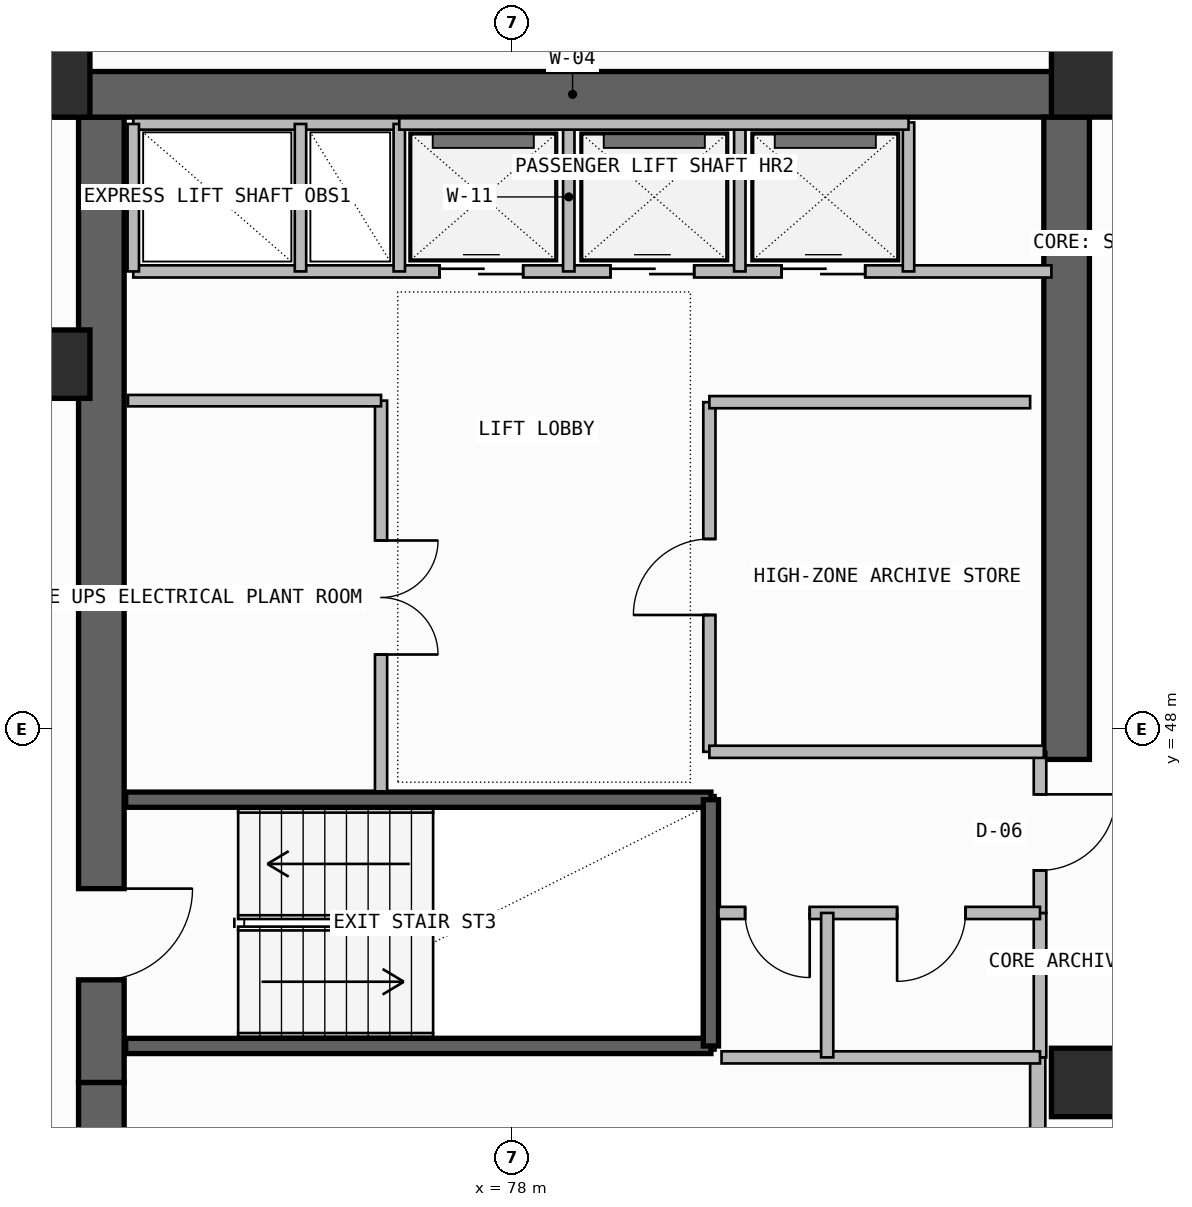
"""IFC4 building model, lengths in metres.
Left out: names, types, materials, properties, quantities, classifications, styles, units other than length and angle.
Written with IfcOpenShell. Run it as: python <this file> out.ifc"""

import sys

from ifc_helpers import new_model, si_unit, direction, frame, frame_2d, origin, origin_2d, place, context, subcontext, project, spatial, rectangle, extrude, element, fill, save


model = new_model("IFC4")
c1 = context("Model", 3, precision=1e-05, world=origin(), true_north=direction((0.0, 1.0)))
c2 = subcontext(c1, "Body", "Model", "MODEL_VIEW")
j1 = project(units=[si_unit("LENGTHUNIT", "METRE"), si_unit("PLANEANGLEUNIT", "RADIAN")], contexts=[c1])
p1 = place(None, origin())
s1 = spatial("IfcSite", under=j1, at=p1, CompositionType="ELEMENT")
p2 = place(p1, origin())
s2 = spatial("IfcBuilding", under=s1, at=p2, CompositionType="ELEMENT")
p3 = place(p2, frame((0.0, 0.0, 257.22)))
s3 = spatial("IfcBuildingStorey", under=s2, at=p3, CompositionType="ELEMENT", Elevation=257.22)
p4 = place(p3, frame((72.6, 35.5, -0.26), z_axis=(0.0, 0.0, 1.0), x_axis=(0.0, 1.0, 0.0)))
e1 = element("IfcWall", 1, at=p4, inside=s3, PredefinedType="SHEAR", context=c2, shape_type="SweptSolid", body=[
    extrude(rectangle(XDim=7.85, YDim=0.6, at=frame_2d((3.925, 0.0))), origin(), (0.0, 0.0, 1.0), 3.52),
])
p5 = place(p4, frame((1.45, 0.0, 0.26)))
e2 = element("IfcOpeningElement", 2, at=p5, cuts=e1, PredefinedType="OPENING", context=c2, shape_type="SweptSolid", body=[
    extrude(rectangle(XDim=1.2, YDim=2.2, at=frame_2d((0.6, 1.1))), frame((0.0, 0.31, 0.0), z_axis=(0.0, -1.0, 0.0), x_axis=(1.0, 0.0, 0.0)), (0.0, 0.0, 1.0), 0.62),
])
p6 = place(p3, frame((72.6, 43.35, -0.26), z_axis=(0.0, 0.0, 1.0), x_axis=(0.0, 1.0, 0.0)))
e3 = element("IfcWall", 3, at=p6, inside=s3, PredefinedType="SHEAR", context=c2, shape_type="SweptSolid", body=[
    extrude(rectangle(XDim=12.7, YDim=0.6, at=frame_2d((6.35, 0.0))), origin(), (0.0, 0.0, 1.0), 3.52),
])
p7 = place(p6, frame((1.35, 0.0, 0.26)))
e4 = element("IfcOpeningElement", 4, at=p7, cuts=e3, PredefinedType="OPENING", context=c2, shape_type="SweptSolid", body=[
    extrude(rectangle(XDim=1.2, YDim=2.2, at=frame_2d((0.6, 1.1))), frame((0.0, 0.31, 0.0), z_axis=(0.0, -1.0, 0.0), x_axis=(1.0, 0.0, 0.0)), (0.0, 0.0, 1.0), 0.62),
])
p8 = place(p3, frame((72.0, 56.35, -0.26), z_axis=(0.0, 0.0, 1.0), x_axis=(1.0, 0.0, 0.0)))
e5 = element("IfcWall", 5, at=p8, inside=s3, PredefinedType="SHEAR", context=c2, shape_type="SweptSolid", body=[
    extrude(rectangle(XDim=13.6, YDim=0.6, at=frame_2d((6.8, 0.0))), origin(), (0.0, 0.0, 1.0), 3.52),
])
p9 = place(p3, frame((85.3, 47.6, -0.26), z_axis=(0.0, 0.0, 1.0), x_axis=(0.0, 1.0, 0.0)))
e6 = element("IfcWall", 6, at=p9, inside=s3, PredefinedType="SHEAR", context=c2, shape_type="SweptSolid", body=[
    extrude(rectangle(XDim=8.45, YDim=0.6, at=frame_2d((4.225, 0.0))), origin(), (0.0, 0.0, 1.0), 3.52),
])
for number, where, z_axis, x_axis in (
    (7, (85.55, 43.35, 0.0), (0.0, 0.0, 1.0), (1.0, 0.0, 0.0)),
    (8, (72.0, 52.8, 0.0), (0.0, 0.0, 1.0), (1.0, 0.0, 0.0)),
    (9, (72.0, 56.5, 0.0), (0.0, 0.0, 1.0), (1.0, 0.0, 0.0)),
    (10, (85.55, 56.5, 0.0), (0.0, 0.0, 1.0), (1.0, 0.0, 0.0)),
):
    element("IfcColumn", number, at=place(p3, frame(where, z_axis=z_axis, x_axis=x_axis)), inside=s3, PredefinedType="COLUMN", context=c2, shape_type="SweptSolid", body=[
        extrude(rectangle(XDim=0.9, YDim=0.9, at=origin_2d()), origin(), (0.0, 0.0, 1.0), 3.52),
    ])
p10 = place(p3, frame((84.92, 38.85, 0.0), z_axis=(0.0, 0.0, 1.0), x_axis=(0.0, 1.0, 0.0)))
e11 = element("IfcWall", 11, at=p10, inside=s3, PredefinedType="SOLIDWALL", context=c2, shape_type="SweptSolid", body=[
    extrude(rectangle(XDim=4.83, YDim=0.2, at=frame_2d((2.415, 0.0))), origin(), (0.0, 0.0, 1.0), 3.26),
])
p11 = place(p10, frame((1.25, 0.0, 0.0)))
e12 = element("IfcOpeningElement", 12, at=p11, cuts=e11, PredefinedType="OPENING", context=c2, shape_type="SweptSolid", body=[
    extrude(rectangle(XDim=1.1, YDim=2.2, at=frame_2d((0.55, 1.1))), frame((0.0, 0.11, 0.0), z_axis=(0.0, -1.0, 0.0), x_axis=(1.0, 0.0, 0.0)), (0.0, 0.0, 1.0), 0.22),
])
for number, where, z_axis, x_axis in (
    (13, (72.92, 43.83, -0.26), (0.0, 0.0, 1.0), (1.0, 0.0, 0.0)),
    (14, (72.92, 47.07, -0.26), (0.0, 0.0, 1.0), (1.0, 0.0, 0.0)),
):
    element("IfcWall", number, at=place(p3, frame(where, z_axis=z_axis, x_axis=x_axis)), inside=s3, PredefinedType="SOLIDWALL", context=c2, shape_type="SweptSolid", body=[
        extrude(rectangle(XDim=7.7, YDim=0.2, at=frame_2d((3.85, 0.0))), origin(), (0.0, 0.0, 1.0), 3.52),
    ])
p12 = place(p3, frame((80.62, 43.83, -0.26), z_axis=(0.0, 0.0, 1.0), x_axis=(0.0, 1.0, 0.0)))
e15 = element("IfcWall", 15, at=p12, inside=s3, PredefinedType="SOLIDWALL", context=c2, shape_type="SweptSolid", body=[
    extrude(rectangle(XDim=3.24, YDim=0.2, at=frame_2d((1.62, 0.0))), origin(), (0.0, 0.0, 1.0), 3.52),
])
p13 = place(p3, frame((84.95, 43.68, 0.0), z_axis=(0.0, 0.0, 1.0), x_axis=(0.0, 1.0, 0.0)))
e16 = element("IfcWall", 16, at=p13, inside=s3, PredefinedType="PLUMBINGWALL", context=c2, shape_type="SweptSolid", body=[
    extrude(rectangle(XDim=1.9, YDim=0.165, at=frame_2d((0.95, 0.0))), origin(), (0.0, 0.0, 1.0), 3.26),
])
p14 = place(p3, frame((84.95, 45.58, 0.0), z_axis=(0.0, 0.0, 1.0), x_axis=(0.0, 1.0, 0.0)))
e17 = element("IfcWall", 17, at=p14, inside=s3, PredefinedType="PARTITIONING", context=c2, shape_type="SweptSolid", body=[
    extrude(rectangle(XDim=2.12, YDim=0.165, at=frame_2d((1.06, 0.0))), origin(), (0.0, 0.0, 1.0), 3.26),
])
p15 = place(p14, frame((0.56, 0.0, 0.0)))
e18 = element("IfcOpeningElement", 18, at=p15, cuts=e17, PredefinedType="OPENING", context=c2, shape_type="SweptSolid", body=[
    extrude(rectangle(XDim=1.0, YDim=2.2, at=frame_2d((0.5, 1.1))), frame((0.0, 0.093, 0.0), z_axis=(0.0, -1.0, 0.0), x_axis=(1.0, 0.0, 0.0)), (0.0, 0.0, 1.0), 0.185),
])
p16 = place(p3, frame((80.72, 45.58, 0.0), z_axis=(0.0, 0.0, 1.0), x_axis=(1.0, 0.0, 0.0)))
e19 = element("IfcWall", 19, at=p16, inside=s3, PredefinedType="PLUMBINGWALL", context=c2, shape_type="SweptSolid", body=[
    extrude(rectangle(XDim=4.23, YDim=0.16, at=frame_2d((2.115, 0.0))), origin(), (0.0, 0.0, 1.0), 3.26),
])
p17 = place(p16, frame((0.35, 0.0, 0.0)))
e20 = element("IfcOpeningElement", 20, at=p17, cuts=e19, PredefinedType="OPENING", context=c2, shape_type="SweptSolid", body=[
    extrude(rectangle(XDim=0.85, YDim=2.05, at=frame_2d((0.425, 1.025))), frame((0.0, 0.09, 0.0), z_axis=(0.0, -1.0, 0.0), x_axis=(1.0, 0.0, 0.0)), (0.0, 0.0, 1.0), 0.18),
])
p18 = place(p16, frame((2.35, 0.0, 0.0)))
e21 = element("IfcOpeningElement", 21, at=p18, cuts=e19, PredefinedType="OPENING", context=c2, shape_type="SweptSolid", body=[
    extrude(rectangle(XDim=0.9, YDim=2.1, at=frame_2d((0.45, 1.05))), frame((0.0, 0.09, 0.0), z_axis=(0.0, -1.0, 0.0), x_axis=(1.0, 0.0, 0.0)), (0.0, 0.0, 1.0), 0.18),
])
p19 = place(p3, frame((80.76, 43.68, 0.0), z_axis=(0.0, 0.0, 1.0), x_axis=(1.0, 0.0, 0.0)))
e22 = element("IfcWall", 22, at=p19, inside=s3, PredefinedType="PLUMBINGWALL", context=c2, shape_type="SweptSolid", body=[
    extrude(rectangle(XDim=4.19, YDim=0.16, at=frame_2d((2.095, 0.0))), origin(), (0.0, 0.0, 1.0), 3.26),
])
p20 = place(p3, frame((82.15, 43.68, 0.0), z_axis=(0.0, 0.0, 1.0), x_axis=(0.0, 1.0, 0.0)))
e23 = element("IfcWall", 23, at=p20, inside=s3, PredefinedType="PLUMBINGWALL", context=c2, shape_type="SweptSolid", body=[
    extrude(rectangle(XDim=1.9, YDim=0.16, at=frame_2d((0.95, 0.0))), origin(), (0.0, 0.0, 1.0), 3.26),
])
p21 = place(p3, frame((76.28, 47.18, 0.0), z_axis=(0.0, 0.0, 1.0), x_axis=(0.0, 1.0, 0.0)))
e24 = element("IfcWall", 24, at=p21, inside=s3, PredefinedType="SOLIDWALL", context=c2, shape_type="SweptSolid", body=[
    extrude(rectangle(XDim=5.14, YDim=0.16, at=frame_2d((2.57, 0.0))), origin(), (0.0, 0.0, 1.0), 3.26),
])
p22 = place(p21, frame((1.8, 0.0, 0.0)))
e25 = element("IfcOpeningElement", 25, at=p22, cuts=e24, PredefinedType="OPENING", context=c2, shape_type="SweptSolid", body=[
    extrude(rectangle(XDim=1.5, YDim=2.25, at=frame_2d((0.75, 1.125))), frame((0.0, 0.09, 0.0), z_axis=(0.0, -1.0, 0.0), x_axis=(1.0, 0.0, 0.0)), (0.0, 0.0, 1.0), 0.18),
])
p23 = place(p3, frame((72.95, 52.32, 0.0), z_axis=(0.0, 0.0, 1.0), x_axis=(1.0, 0.0, 0.0)))
e26 = element("IfcWall", 26, at=p23, inside=s3, PredefinedType="SOLIDWALL", context=c2, shape_type="SweptSolid", body=[
    extrude(rectangle(XDim=3.33, YDim=0.15, at=frame_2d((1.665, 0.0))), origin(), (0.0, 0.0, 1.0), 3.26),
])
p24 = place(p3, frame((80.6, 47.7, 0.0), z_axis=(0.0, 0.0, 1.0), x_axis=(0.0, 1.0, 0.0)))
e27 = element("IfcWall", 27, at=p24, inside=s3, PredefinedType="SOLIDWALL", context=c2, shape_type="SweptSolid", body=[
    extrude(rectangle(XDim=4.6, YDim=0.16, at=frame_2d((2.3, 0.0))), origin(), (0.0, 0.0, 1.0), 3.26),
])
p25 = place(p24, frame((1.8, 0.0, 0.0)))
e28 = element("IfcOpeningElement", 28, at=p25, cuts=e27, PredefinedType="OPENING", context=c2, shape_type="SweptSolid", body=[
    extrude(rectangle(XDim=1.0, YDim=2.2, at=frame_2d((0.5, 1.1))), frame((0.0, 0.09, 0.0), z_axis=(0.0, -1.0, 0.0), x_axis=(1.0, 0.0, 0.0)), (0.0, 0.0, 1.0), 0.18),
])
p26 = place(p3, frame((80.6, 47.7, 0.0), z_axis=(0.0, 0.0, 1.0), x_axis=(1.0, 0.0, 0.0)))
e29 = element("IfcWall", 29, at=p26, inside=s3, PredefinedType="SOLIDWALL", context=c2, shape_type="SweptSolid", body=[
    extrude(rectangle(XDim=4.4, YDim=0.16, at=frame_2d((2.2, 0.0))), origin(), (0.0, 0.0, 1.0), 3.26),
])
p27 = place(p3, frame((80.6, 52.3, 0.0), z_axis=(0.0, 0.0, 1.0), x_axis=(1.0, 0.0, 0.0)))
e30 = element("IfcWall", 30, at=p27, inside=s3, PredefinedType="SOLIDWALL", context=c2, shape_type="SweptSolid", body=[
    extrude(rectangle(XDim=4.22, YDim=0.16, at=frame_2d((2.11, 0.0))), origin(), (0.0, 0.0, 1.0), 3.26),
])
p28 = place(p3, frame((73.02, 54.02, 0.0), z_axis=(0.0, 0.0, 1.0), x_axis=(1.0, 0.0, 0.0)))
e31 = element("IfcWall", 31, at=p28, inside=s3, PredefinedType="SOLIDWALL", context=c2, shape_type="SweptSolid", body=[
    extrude(rectangle(XDim=12.08, YDim=0.16, at=frame_2d((6.04, 0.0))), origin(), (0.0, 0.0, 1.0), 3.26),
])
p29 = place(p28, frame((4.03, 0.0, 0.0)))
e32 = element("IfcOpeningElement", 32, at=p29, cuts=e31, PredefinedType="OPENING", context=c2, shape_type="SweptSolid", body=[
    extrude(rectangle(XDim=1.1, YDim=2.25, at=frame_2d((0.55, 1.125))), frame((0.0, 0.09, 0.0), z_axis=(0.0, -1.0, 0.0), x_axis=(1.0, 0.0, 0.0)), (0.0, 0.0, 1.0), 0.18),
])
p30 = place(p28, frame((6.28, 0.0, 0.0)))
e33 = element("IfcOpeningElement", 33, at=p30, cuts=e31, PredefinedType="OPENING", context=c2, shape_type="SweptSolid", body=[
    extrude(rectangle(XDim=1.1, YDim=2.25, at=frame_2d((0.55, 1.125))), frame((0.0, 0.09, 0.0), z_axis=(0.0, -1.0, 0.0), x_axis=(1.0, 0.0, 0.0)), (0.0, 0.0, 1.0), 0.18),
])
p31 = place(p28, frame((8.53, 0.0, 0.0)))
e34 = element("IfcOpeningElement", 34, at=p31, cuts=e31, PredefinedType="OPENING", context=c2, shape_type="SweptSolid", body=[
    extrude(rectangle(XDim=1.1, YDim=2.25, at=frame_2d((0.55, 1.125))), frame((0.0, 0.09, 0.0), z_axis=(0.0, -1.0, 0.0), x_axis=(1.0, 0.0, 0.0)), (0.0, 0.0, 1.0), 0.18),
])
p32 = place(p3, frame((73.02, 55.96, 0.0), z_axis=(0.0, 0.0, 1.0), x_axis=(1.0, 0.0, 0.0)))
e35 = element("IfcWall", 35, at=p32, inside=s3, PredefinedType="SOLIDWALL", context=c2, shape_type="SweptSolid", body=[
    extrude(rectangle(XDim=3.5, YDim=0.15, at=frame_2d((1.75, 0.0))), origin(), (0.0, 0.0, 1.0), 3.26),
])
p33 = place(p3, frame((73.02, 54.02, 0.0), z_axis=(0.0, 0.0, 1.0), x_axis=(0.0, 1.0, 0.0)))
e36 = element("IfcWall", 36, at=p33, inside=s3, PredefinedType="PLUMBINGWALL", context=c2, shape_type="SweptSolid", body=[
    extrude(rectangle(XDim=1.94, YDim=0.15, at=frame_2d((0.97, 0.0))), origin(), (0.0, 0.0, 1.0), 3.26),
])
p34 = place(p3, frame((76.52, 54.02, 0.0), z_axis=(0.0, 0.0, 1.0), x_axis=(0.0, 1.0, 0.0)))
e37 = element("IfcWall", 37, at=p34, inside=s3, PredefinedType="SOLIDWALL", context=c2, shape_type="SweptSolid", body=[
    extrude(rectangle(XDim=1.94, YDim=0.15, at=frame_2d((0.97, 0.0))), origin(), (0.0, 0.0, 1.0), 3.26),
])
p35 = place(p3, frame((75.22, 54.02, 0.0), z_axis=(0.0, 0.0, 1.0), x_axis=(0.0, 1.0, 0.0)))
e38 = element("IfcWall", 38, at=p35, inside=s3, PredefinedType="PLUMBINGWALL", context=c2, shape_type="SweptSolid", body=[
    extrude(rectangle(XDim=1.94, YDim=0.15, at=frame_2d((0.97, 0.0))), origin(), (0.0, 0.0, 1.0), 3.26),
])
for number, where, z_axis, x_axis in (
    (39, (78.75, 54.02, 0.0), (0.0, 0.0, 1.0), (0.0, 1.0, 0.0)),
    (40, (81.0, 54.02, 0.0), (0.0, 0.0, 1.0), (0.0, 1.0, 0.0)),
):
    element("IfcWall", number, at=place(p3, frame(where, z_axis=z_axis, x_axis=x_axis)), inside=s3, PredefinedType="PLUMBINGWALL", context=c2, shape_type="SweptSolid", body=[
        extrude(rectangle(XDim=1.96, YDim=0.15, at=frame_2d((0.98, 0.0))), origin(), (0.0, 0.0, 1.0), 3.26),
    ])
p36 = place(p3, frame((83.22, 54.02, 0.0), z_axis=(0.0, 0.0, 1.0), x_axis=(0.0, 1.0, 0.0)))
e41 = element("IfcWall", 41, at=p36, inside=s3, PredefinedType="SOLIDWALL", context=c2, shape_type="SweptSolid", body=[
    extrude(rectangle(XDim=1.96, YDim=0.15, at=frame_2d((0.98, 0.0))), origin(), (0.0, 0.0, 1.0), 3.26),
])
p37 = place(p3, frame((76.52, 55.96, 0.0), z_axis=(0.0, 0.0, 1.0), x_axis=(1.0, 0.0, 0.0)))
e42 = element("IfcWall", 42, at=p37, inside=s3, PredefinedType="SOLIDWALL", context=c2, shape_type="SweptSolid", body=[
    extrude(rectangle(XDim=6.7, YDim=0.15, at=frame_2d((3.35, 0.0))), origin(), (0.0, 0.0, 1.0), 3.26),
])
p38 = place(p7, frame((1.2, 0.0, 0.0), z_axis=(0.0, 0.0, 1.0), x_axis=(-1.0, 0.0, 0.0)))
e43 = element("IfcDoor", 43, at=p38, inside=s3, OperationType="SINGLE_SWING_LEFT", PredefinedType="USERDEFINED", context=c2, shape_type="SweptSolid", body=[
    extrude(rectangle(XDim=1.2, YDim=2.2, at=frame_2d((0.6, 1.1))), frame((0.0, 0.025, 0.0), z_axis=(0.0, -1.0, 0.0), x_axis=(1.0, 0.0, 0.0)), (0.0, 0.0, 1.0), 0.05),
])
fill(e4, e43)
p39 = place(p15, frame((1.0, 0.0, 0.0), z_axis=(0.0, 0.0, 1.0), x_axis=(-1.0, 0.0, 0.0)))
e44 = element("IfcDoor", 44, at=p39, inside=s3, OperationType="SINGLE_SWING_LEFT", PredefinedType="DOOR", context=c2, shape_type="SweptSolid", body=[
    extrude(rectangle(XDim=1.0, YDim=2.2, at=frame_2d((0.5, 1.1))), frame((0.0, 0.025, 0.0), z_axis=(0.0, -1.0, 0.0), x_axis=(1.0, 0.0, 0.0)), (0.0, 0.0, 1.0), 0.05),
])
fill(e18, e44)
p40 = place(p17, frame((0.85, 0.0, 0.0), z_axis=(0.0, 0.0, 1.0), x_axis=(-1.0, 0.0, 0.0)))
e45 = element("IfcDoor", 45, at=p40, inside=s3, OperationType="SINGLE_SWING_LEFT", PredefinedType="DOOR", context=c2, shape_type="SweptSolid", body=[
    extrude(rectangle(XDim=0.85, YDim=2.05, at=frame_2d((0.425, 1.025))), frame((0.0, 0.025, 0.0), z_axis=(0.0, -1.0, 0.0), x_axis=(1.0, 0.0, 0.0)), (0.0, 0.0, 1.0), 0.05),
])
fill(e20, e45)
p41 = place(p18, frame((0.9, 0.0, 0.0), z_axis=(0.0, 0.0, 1.0), x_axis=(-1.0, 0.0, 0.0)))
e46 = element("IfcDoor", 46, at=p41, inside=s3, OperationType="SINGLE_SWING_RIGHT", PredefinedType="DOOR", context=c2, shape_type="SweptSolid", body=[
    extrude(rectangle(XDim=0.9, YDim=2.1, at=frame_2d((0.45, 1.05))), frame((0.0, 0.025, 0.0), z_axis=(0.0, -1.0, 0.0), x_axis=(1.0, 0.0, 0.0)), (0.0, 0.0, 1.0), 0.05),
])
fill(e21, e46)
p42 = place(p22, frame((1.5, 0.0, 0.0), z_axis=(0.0, 0.0, 1.0), x_axis=(-1.0, 0.0, 0.0)))
e47 = element("IfcDoor", 47, at=p42, inside=s3, OperationType="DOUBLE_DOOR_SINGLE_SWING", PredefinedType="DOOR", context=c2, shape_type="SweptSolid", body=[
    extrude(rectangle(XDim=1.5, YDim=2.25, at=frame_2d((0.75, 1.125))), frame((0.0, 0.025, 0.0), z_axis=(0.0, -1.0, 0.0), x_axis=(1.0, 0.0, 0.0)), (0.0, 0.0, 1.0), 0.05),
])
fill(e25, e47)
p43 = place(p25, origin())
e48 = element("IfcDoor", 48, at=p43, inside=s3, OperationType="SINGLE_SWING_LEFT", PredefinedType="DOOR", context=c2, shape_type="SweptSolid", body=[
    extrude(rectangle(XDim=1.0, YDim=2.2, at=frame_2d((0.5, 1.1))), frame((0.0, 0.025, 0.0), z_axis=(0.0, -1.0, 0.0), x_axis=(1.0, 0.0, 0.0)), (0.0, 0.0, 1.0), 0.05),
])
fill(e28, e48)
p44 = place(p29, origin())
e49 = element("IfcDoor", 49, at=p44, inside=s3, OperationType="DOUBLE_DOOR_SLIDING", PredefinedType="DOOR", context=c2, shape_type="SweptSolid", body=[
    extrude(rectangle(XDim=1.1, YDim=2.25, at=frame_2d((0.55, 1.125))), frame((0.0, 0.025, 0.0), z_axis=(0.0, -1.0, 0.0), x_axis=(1.0, 0.0, 0.0)), (0.0, 0.0, 1.0), 0.05),
])
fill(e32, e49)
p45 = place(p30, origin())
e50 = element("IfcDoor", 50, at=p45, inside=s3, OperationType="DOUBLE_DOOR_SLIDING", PredefinedType="DOOR", context=c2, shape_type="SweptSolid", body=[
    extrude(rectangle(XDim=1.1, YDim=2.25, at=frame_2d((0.55, 1.125))), frame((0.0, 0.025, 0.0), z_axis=(0.0, -1.0, 0.0), x_axis=(1.0, 0.0, 0.0)), (0.0, 0.0, 1.0), 0.05),
])
fill(e33, e50)
p46 = place(p31, origin())
e51 = element("IfcDoor", 51, at=p46, inside=s3, OperationType="DOUBLE_DOOR_SLIDING", PredefinedType="DOOR", context=c2, shape_type="SweptSolid", body=[
    extrude(rectangle(XDim=1.1, YDim=2.25, at=frame_2d((0.55, 1.125))), frame((0.0, 0.025, 0.0), z_axis=(0.0, -1.0, 0.0), x_axis=(1.0, 0.0, 0.0)), (0.0, 0.0, 1.0), 0.05),
])
fill(e34, e51)
save(model, sys.argv[1])
